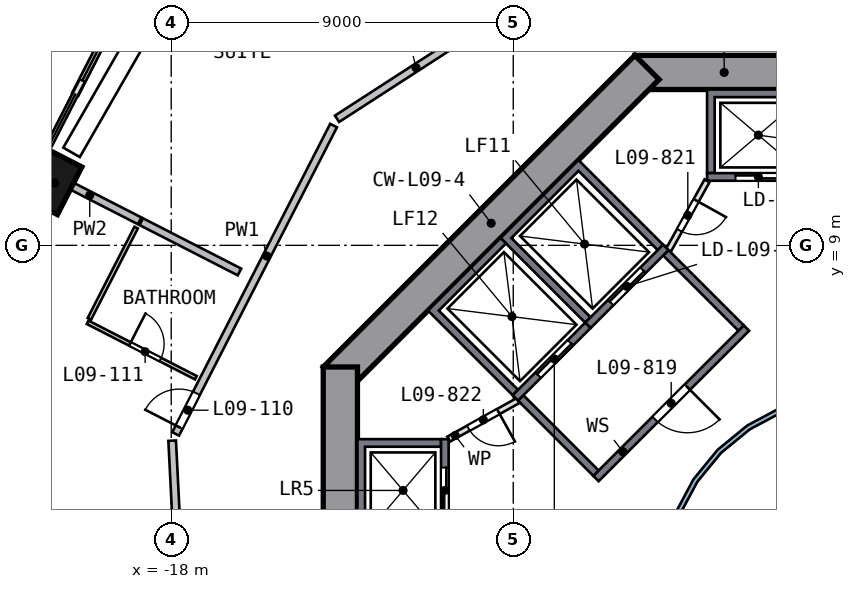
"""IFC4 building model, lengths in metres.
Left out: names, types, materials, properties, quantities, classifications, styles, units other than length and angle.
Written with IfcOpenShell. Run it as: python <this file> out.ifc"""

import sys

from ifc_helpers import new_model, si_unit, direction, frame, frame_2d, origin, origin_2d, place, context, subcontext, project, spatial, polyline, rectangle, outline, extrude, element, fill, save


model = new_model("IFC4")
c1 = context("Model", 3, precision=1e-05, world=origin(), true_north=direction((0.0, 1.0)))
c2 = subcontext(c1, "Body", "Model", "MODEL_VIEW")
j1 = project(units=[si_unit("LENGTHUNIT", "METRE"), si_unit("PLANEANGLEUNIT", "RADIAN")], contexts=[c1])
p1 = place(None, origin())
s1 = spatial("IfcSite", under=j1, at=p1, CompositionType="ELEMENT")
p2 = place(p1, origin())
s2 = spatial("IfcBuilding", under=s1, at=p2, CompositionType="ELEMENT")
p3 = place(p2, frame((0.0, 0.0, 46.0)))
s3 = spatial("IfcBuildingStorey", under=s2, at=p3, CompositionType="ELEMENT", Elevation=46.0)
p4 = place(p3, frame((-21.013, 10.762, 0.0), z_axis=(-0.050345335, -0.100386469, 0.993673943), x_axis=(-0.452981845, -0.884418594, -0.112299596)))
e1 = element("IfcColumn", 1, at=p4, inside=s3, PredefinedType="COLUMN", context=c2, shape_type="SweptSolid", body=[
    extrude(rectangle(XDim=1.4, YDim=0.9, at=origin_2d()), origin(), (0.0, 0.0, 1.0), 3.21),
])
p5 = place(p3, frame((5.799, 13.55, 0.0), z_axis=(0.0, 0.0, 1.0), x_axis=(-1.0, 0.0, 0.0)))
e2 = element("IfcWall", 2, at=p5, inside=s3, PredefinedType="SHEAR", context=c2, shape_type="SweptSolid", body=[
    extrude(rectangle(XDim=11.598, YDim=0.9, at=frame_2d((5.799, 0.0))), origin(), (0.0, 0.0, 1.0), 3.5),
])
p6 = place(p5, frame((4.899, 0.0, 0.0)))
e3 = element("IfcOpeningElement", 3, at=p6, cuts=e2, PredefinedType="OPENING", context=c2, shape_type="SweptSolid", body=[
    extrude(rectangle(XDim=1.8, YDim=2.1, at=frame_2d((0.9, 1.05))), frame((0.0, 0.46, 0.0), z_axis=(0.0, -1.0, 0.0), x_axis=(1.0, 0.0, 0.0)), (0.0, 0.0, 1.0), 0.92),
])
p7 = place(p3, frame((-5.481, 13.682, 0.0), z_axis=(0.0, 0.0, 1.0), x_axis=(-0.707106781, -0.707106781, 0.0)))
e4 = element("IfcWall", 4, at=p7, inside=s3, PredefinedType="SHEAR", context=c2, shape_type="SweptSolid", body=[
    extrude(rectangle(XDim=11.598, YDim=0.9, at=frame_2d((5.799, 0.0))), origin(), (0.0, 0.0, 1.0), 3.5),
])
p8 = place(p3, frame((-13.55, 5.799, 0.0), z_axis=(0.0, 0.0, 1.0), x_axis=(0.0, -1.0, 0.0)))
e5 = element("IfcWall", 5, at=p8, inside=s3, PredefinedType="SHEAR", context=c2, shape_type="SweptSolid", body=[
    extrude(rectangle(XDim=11.598, YDim=0.9, at=frame_2d((5.799, 0.0))), origin(), (0.0, 0.0, 1.0), 3.5),
])
p9 = place(p8, frame((4.899, 0.0, 0.0)))
e6 = element("IfcOpeningElement", 6, at=p9, cuts=e5, PredefinedType="OPENING", context=c2, shape_type="SweptSolid", body=[
    extrude(rectangle(XDim=1.8, YDim=2.1, at=frame_2d((0.9, 1.05))), frame((0.0, 0.46, 0.0), z_axis=(0.0, -1.0, 0.0), x_axis=(1.0, 0.0, 0.0)), (0.0, 0.0, 1.0), 0.92),
])
p10 = place(p3, frame((-18.607, 16.72, 0.0), z_axis=(0.0, 0.0, 1.0), x_axis=(-0.455821941, -0.890070985, 0.0)))
e7 = element("IfcWall", 7, at=p10, inside=s3, PredefinedType="SOLIDWALL", context=c2, shape_type="SweptSolid", body=[
    extrude(rectangle(XDim=4.199, YDim=0.15, at=frame_2d((2.099, 0.0))), origin(), (0.0, 0.0, 1.0), 2.425),
])
p11 = place(p10, frame((1.399, 0.0, 0.0)))
e8 = element("IfcOpeningElement", 8, at=p11, cuts=e7, PredefinedType="OPENING", context=c2, shape_type="SweptSolid", body=[
    extrude(rectangle(XDim=2.4, YDim=2.4, at=frame_2d((1.2, 1.2))), frame((0.0, 0.085, 0.0), z_axis=(0.0, -1.0, 0.0), x_axis=(1.0, 0.0, 0.0)), (0.0, 0.0, 1.0), 0.17),
])
p12 = place(p3, frame((-20.924, 18.832, 0.0), z_axis=(0.0, 0.0, 1.0), x_axis=(-0.45585284, -0.89005516, 0.0)))
e9 = element("IfcWall", 9, at=p12, inside=s3, PredefinedType="SOLIDWALL", context=c2, shape_type="SweptSolid", body=[
    extrude(rectangle(XDim=13.723, YDim=0.5, at=frame_2d((6.862, 0.0))), origin(), (0.0, 0.0, 1.0), 0.7),
])
p13 = place(p3, origin())
e10 = element("IfcWall", 10, at=p13, inside=s3, PredefinedType="SOLIDWALL", context=c2, shape_type="SweptSolid", body=[
    extrude(outline(polyline([(-3.9, 10.9), (-3.9, 13.1), (-1.2, 13.1), (-1.2, 10.9), (-1.4, 10.9), (-1.4, 12.9), (-3.7, 12.9), (-3.7, 10.9), (-3.9, 10.9)])), origin(), (0.0, 0.0, 1.0), 3.19),
])
p14 = place(p3, frame((-1.2, 10.8, 0.0), z_axis=(0.0, 0.0, 1.0), x_axis=(-1.0, 0.0, 0.0)))
e11 = element("IfcWall", 11, at=p14, inside=s3, PredefinedType="SOLIDWALL", context=c2, shape_type="SweptSolid", body=[
    extrude(rectangle(XDim=2.7, YDim=0.2, at=frame_2d((1.35, 0.0))), origin(), (0.0, 0.0, 1.0), 3.19),
])
p15 = place(p14, frame((0.75, 0.0, 0.0)))
e12 = element("IfcOpeningElement", 12, at=p15, cuts=e11, PredefinedType="OPENING", context=c2, shape_type="SweptSolid", body=[
    extrude(rectangle(XDim=1.2, YDim=2.1, at=frame_2d((0.6, 1.05))), frame((0.0, 0.11, 0.0), z_axis=(0.0, -1.0, 0.0), x_axis=(1.0, 0.0, 0.0)), (0.0, 0.0, 1.0), 0.22),
])
p16 = place(p3, origin())
e13 = element("IfcWall", 13, at=p16, inside=s3, PredefinedType="SOLIDWALL", context=c2, shape_type="SweptSolid", body=[
    extrude(outline(polyline([(-13.1, 3.9), (-10.9, 3.9), (-10.9, 3.7), (-12.9, 3.7), (-12.9, 1.4), (-10.9, 1.4), (-10.9, 1.2), (-13.1, 1.2), (-13.1, 3.9)])), origin(), (0.0, 0.0, 1.0), 3.19),
])
p17 = place(p3, frame((-10.8, 1.2, 0.0), z_axis=(0.0, 0.0, 1.0), x_axis=(0.0, 1.0, 0.0)))
e14 = element("IfcWall", 14, at=p17, inside=s3, PredefinedType="SOLIDWALL", context=c2, shape_type="SweptSolid", body=[
    extrude(rectangle(XDim=2.7, YDim=0.2, at=frame_2d((1.35, 0.0))), origin(), (0.0, 0.0, 1.0), 3.19),
])
p18 = place(p17, frame((0.75, 0.0, 0.0)))
e15 = element("IfcOpeningElement", 15, at=p18, cuts=e14, PredefinedType="OPENING", context=c2, shape_type="SweptSolid", body=[
    extrude(rectangle(XDim=1.2, YDim=2.1, at=frame_2d((0.6, 1.05))), frame((0.0, 0.11, 0.0), z_axis=(0.0, -1.0, 0.0), x_axis=(1.0, 0.0, 0.0)), (0.0, 0.0, 1.0), 0.22),
])
p19 = place(p3, origin())
e16 = element("IfcWall", 16, at=p19, inside=s3, PredefinedType="SOLIDWALL", context=c2, shape_type="SweptSolid", body=[
    extrude(outline(polyline([(-9.334, 9.192), (-7.283, 11.243), (-5.056, 9.016), (-5.197, 8.874), (-7.283, 10.96), (-9.051, 9.192), (-6.965, 7.106), (-7.106, 6.965), (-9.334, 9.192)])), origin(), (0.0, 0.0, 1.0), 3.19),
])
p20 = place(p3, frame((-4.985, 8.945, 0.0), z_axis=(0.0, 0.0, 1.0), x_axis=(-0.707106781, -0.707106781, 0.0)))
e17 = element("IfcWall", 17, at=p20, inside=s3, PredefinedType="SOLIDWALL", context=c2, shape_type="SweptSolid", body=[
    extrude(rectangle(XDim=2.9, YDim=0.2, at=frame_2d((1.45, 0.0))), origin(), (0.0, 0.0, 1.0), 3.19),
])
p21 = place(p20, frame((0.85, 0.0, 0.0)))
e18 = element("IfcOpeningElement", 18, at=p21, cuts=e17, PredefinedType="OPENING", context=c2, shape_type="SweptSolid", body=[
    extrude(rectangle(XDim=1.2, YDim=2.1, at=frame_2d((0.6, 1.05))), frame((0.0, 0.11, 0.0), z_axis=(0.0, -1.0, 0.0), x_axis=(1.0, 0.0, 0.0)), (0.0, 0.0, 1.0), 0.22),
])
p22 = place(p3, origin())
e19 = element("IfcWall", 19, at=p22, inside=s3, PredefinedType="SOLIDWALL", context=c2, shape_type="SweptSolid", body=[
    extrude(outline(polyline([(-11.243, 7.283), (-9.334, 9.192), (-9.192, 9.051), (-10.96, 7.283), (-8.874, 5.197), (-9.016, 5.056), (-11.243, 7.283)])), origin(), (0.0, 0.0, 1.0), 3.19),
])
p23 = place(p3, frame((-7.036, 6.894, 0.0), z_axis=(0.0, 0.0, 1.0), x_axis=(-0.707106781, -0.707106781, 0.0)))
e20 = element("IfcWall", 20, at=p23, inside=s3, PredefinedType="SOLIDWALL", context=c2, shape_type="SweptSolid", body=[
    extrude(rectangle(XDim=2.7, YDim=0.2, at=frame_2d((1.35, 0.0))), origin(), (0.0, 0.0, 1.0), 3.19),
])
p24 = place(p23, frame((0.65, 0.0, 0.0)))
e21 = element("IfcOpeningElement", 21, at=p24, cuts=e20, PredefinedType="OPENING", context=c2, shape_type="SweptSolid", body=[
    extrude(rectangle(XDim=1.2, YDim=2.1, at=frame_2d((0.6, 1.05))), frame((0.0, 0.11, 0.0), z_axis=(0.0, -1.0, 0.0), x_axis=(1.0, 0.0, 0.0)), (0.0, 0.0, 1.0), 0.22),
])
p25 = place(p3, frame((-2.864, 6.823, 0.0), z_axis=(0.0, 0.0, 1.0), x_axis=(-0.707106781, -0.707106781, 0.0)))
e22 = element("IfcWall", 22, at=p25, inside=s3, PredefinedType="SOLIDWALL", context=c2, shape_type="SweptSolid", body=[
    extrude(rectangle(XDim=5.6, YDim=0.2, at=frame_2d((2.8, 0.0))), origin(), (0.0, 0.0, 1.0), 3.19),
])
p26 = place(p25, frame((2.2, 0.0, 0.0)))
e23 = element("IfcOpeningElement", 23, at=p26, cuts=e22, PredefinedType="OPENING", context=c2, shape_type="SweptSolid", body=[
    extrude(rectangle(XDim=1.2, YDim=2.1, at=frame_2d((0.6, 1.05))), frame((0.0, 0.11, 0.0), z_axis=(0.0, -1.0, 0.0), x_axis=(1.0, 0.0, 0.0)), (0.0, 0.0, 1.0), 0.22),
])
for number, where, z_axis, x_axis in (
    (24, (-3.005, 6.823, 0.0), (0.0, 0.0, 1.0), (-0.707, 0.707, 0.0)),
    (25, (-6.823, 3.005, 0.0), (0.0, 0.0, 1.0), (-0.707, 0.707, 0.0)),
):
    element("IfcWall", number, at=place(p3, frame(where, z_axis=z_axis, x_axis=x_axis)), inside=s3, PredefinedType="SOLIDWALL", context=c2, shape_type="SweptSolid", body=[
        extrude(rectangle(XDim=2.8, YDim=0.2, at=frame_2d((1.4, 0.0))), origin(), (0.0, 0.0, 1.0), 3.19),
    ])
p27 = place(p3, frame((-3.9, 10.7, 0.0), z_axis=(0.0, 0.0, 1.0), x_axis=(-0.485692555, -0.874129705, 0.0)))
e26 = element("IfcWall", 26, at=p27, inside=s3, PredefinedType="PARTITIONING", context=c2, shape_type="SweptSolid", body=[
    extrude(rectangle(XDim=2.089, YDim=0.15, at=frame_2d((1.044, 0.0))), origin(), (0.0, 0.0, 1.0), 3.19),
])
p28 = place(p27, frame((0.594, 0.0, 0.0)))
e27 = element("IfcOpeningElement", 27, at=p28, cuts=e26, PredefinedType="OPENING", context=c2, shape_type="SweptSolid", body=[
    extrude(rectangle(XDim=0.9, YDim=2.1, at=frame_2d((0.45, 1.05))), frame((0.0, 0.085, 0.0), z_axis=(0.0, -1.0, 0.0), x_axis=(1.0, 0.0, 0.0)), (0.0, 0.0, 1.0), 0.17),
])
p29 = place(p3, frame((-8.874, 4.914, 0.0), z_axis=(0.0, 0.0, 1.0), x_axis=(-0.874129705, -0.485692555, 0.0)))
e28 = element("IfcWall", 28, at=p29, inside=s3, PredefinedType="PARTITIONING", context=c2, shape_type="SweptSolid", body=[
    extrude(rectangle(XDim=2.089, YDim=0.15, at=frame_2d((1.044, 0.0))), origin(), (0.0, 0.0, 1.0), 3.19),
])
p30 = place(p29, frame((0.594, 0.0, 0.0)))
e29 = element("IfcOpeningElement", 29, at=p30, cuts=e28, PredefinedType="OPENING", context=c2, shape_type="SweptSolid", body=[
    extrude(rectangle(XDim=0.9, YDim=2.1, at=frame_2d((0.45, 1.05))), frame((0.0, 0.085, 0.0), z_axis=(0.0, -1.0, 0.0), x_axis=(1.0, 0.0, 0.0)), (0.0, 0.0, 1.0), 0.17),
])
p31 = place(p3, origin())
e30 = element("IfcWall", 30, at=p31, inside=s3, PredefinedType="SOLIDWALL", context=c2, shape_type="SweptSolid", body=[
    extrude(outline(polyline([(5.021, -0.999), (4.73, -1.959), (4.257, -2.844), (3.62, -3.62), (2.844, -4.257), (1.959, -4.73), (0.999, -5.021), (0.0, -5.12), (-0.999, -5.021), (-1.959, -4.73), (-2.844, -4.257), (-3.62, -3.62), (-4.257, -2.844), (-4.73, -1.959), (-5.021, -0.999), (-5.12, 0.0), (-5.021, 0.999), (-4.73, 1.959), (-4.257, 2.844), (-3.62, 3.62), (-2.844, 4.257), (-1.959, 4.73), (-0.999, 5.021), (0.0, 5.12), (0.999, 5.021), (1.959, 4.73), (2.844, 4.257), (3.62, 3.62), (4.257, 2.844), (4.73, 1.959), (5.021, 0.999), (5.12, 0.0), (5.021, -0.999)]), holes=[polyline([(4.904, 0.976), (4.619, 1.913), (4.157, 2.778), (3.535, 3.535), (2.778, 4.157), (1.913, 4.619), (0.976, 4.904), (0.0, 5.0), (-0.976, 4.904), (-1.913, 4.619), (-2.778, 4.157), (-3.535, 3.535), (-4.157, 2.778), (-4.619, 1.913), (-4.904, 0.976), (-5.0, 0.0), (-4.904, -0.976), (-4.619, -1.913), (-4.157, -2.778), (-3.535, -3.535), (-2.778, -4.157), (-1.913, -4.619), (-0.976, -4.904), (0.0, -5.0), (0.976, -4.904), (1.913, -4.619), (2.778, -4.157), (3.535, -3.535), (4.157, -2.778), (4.619, -1.913), (4.904, -0.976), (5.0, 0.0), (4.904, 0.976)])]), origin(), (0.0, 0.0, 1.0), 3.19),
])
p32 = place(p3, frame((-17.975, 3.86, 0.0), z_axis=(0.0, 0.0, 1.0), x_axis=(0.050258786, -0.998736229, 0.0)))
e31 = element("IfcWall", 31, at=p32, inside=s3, PredefinedType="SOLIDWALL", context=c2, shape_type="SweptSolid", body=[
    extrude(rectangle(XDim=9.516, YDim=0.2, at=frame_2d((4.758, 0.0))), origin(), (0.0, 0.0, 1.0), 3.19),
])
p33 = place(p3, frame((-17.884, 4.039, 0.0), z_axis=(0.0, 0.0, 1.0), x_axis=(0.45584896, 0.890057147, 0.0)))
e32 = element("IfcWall", 32, at=p33, inside=s3, PredefinedType="SOLIDWALL", context=c2, shape_type="SweptSolid", body=[
    extrude(rectangle(XDim=9.115, YDim=0.2, at=frame_2d((4.558, 0.0))), origin(), (0.0, 0.0, 1.0), 3.19),
])
p34 = place(p33, frame((0.2, 0.0, 0.0)))
e33 = element("IfcOpeningElement", 33, at=p34, cuts=e32, PredefinedType="OPENING", context=c2, shape_type="SweptSolid", body=[
    extrude(rectangle(XDim=1.0, YDim=2.1, at=frame_2d((0.5, 1.05))), frame((0.0, 0.11, 0.0), z_axis=(0.0, -1.0, 0.0), x_axis=(1.0, 0.0, 0.0)), (0.0, 0.0, 1.0), 0.22),
])
p35 = place(p3, frame((-13.636, 12.331, 0.0), z_axis=(0.0, 0.0, 1.0), x_axis=(0.83981686, 0.54286982, 0.0)))
e34 = element("IfcWall", 34, at=p35, inside=s3, PredefinedType="SOLIDWALL", context=c2, shape_type="SweptSolid", body=[
    extrude(rectangle(XDim=9.316, YDim=0.2, at=frame_2d((4.658, 0.0))), origin(), (0.0, 0.0, 1.0), 3.19),
])
p36 = place(p35, frame((5.15, 0.0, 0.0)))
e35 = element("IfcOpeningElement", 35, at=p36, cuts=e34, PredefinedType="OPENING", context=c2, shape_type="SweptSolid", body=[
    extrude(rectangle(XDim=1.0, YDim=2.1, at=frame_2d((0.5, 1.05))), frame((0.0, 0.11, 0.0), z_axis=(0.0, -1.0, 0.0), x_axis=(1.0, 0.0, 0.0)), (0.0, 0.0, 1.0), 0.22),
])
p37 = place(p3, frame((-18.83, 9.644, 0.0), z_axis=(0.0, 0.0, 1.0), x_axis=(-0.890051549, 0.45585989, 0.0)))
e36 = element("IfcWall", 36, at=p37, inside=s3, PredefinedType="SOLIDWALL", context=c2, shape_type="SweptSolid", body=[
    extrude(rectangle(XDim=2.952, YDim=0.2, at=frame_2d((1.476, 0.0))), origin(), (0.0, 0.0, 1.0), 3.19),
])
p38 = place(p3, frame((-16.204, 8.299, 0.0), z_axis=(0.0, 0.0, 1.0), x_axis=(-0.890030887, 0.45590023, 0.0)))
e37 = element("IfcWall", 37, at=p38, inside=s3, PredefinedType="SOLIDWALL", context=c2, shape_type="SweptSolid", body=[
    extrude(rectangle(XDim=2.905, YDim=0.2, at=frame_2d((1.452, 0.0))), origin(), (0.0, 0.0, 1.0), 3.19),
])
p39 = place(p3, frame((-20.154, 7.064, 0.0), z_axis=(0.0, 0.0, 1.0), x_axis=(0.455909064, 0.890026362, 0.0)))
e38 = element("IfcWall", 38, at=p39, inside=s3, PredefinedType="PARTITIONING", context=c2, shape_type="SweptSolid", body=[
    extrude(rectangle(XDim=2.7, YDim=0.1, at=frame_2d((1.35, 0.0))), origin(), (0.0, 0.0, 1.0), 3.19),
])
p40 = place(p3, frame((-20.2, 6.975, 0.0), z_axis=(0.0, 0.0, 1.0), x_axis=(0.89003657, -0.455889135, 0.0)))
e39 = element("IfcWall", 39, at=p40, inside=s3, PredefinedType="PARTITIONING", context=c2, shape_type="SweptSolid", body=[
    extrude(rectangle(XDim=3.2, YDim=0.1, at=frame_2d((1.6, 0.0))), origin(), (0.0, 0.0, 1.0), 3.19),
])
p41 = place(p40, frame((1.25, 0.0, 0.0)))
e40 = element("IfcOpeningElement", 40, at=p41, cuts=e39, PredefinedType="OPENING", context=c2, shape_type="SweptSolid", body=[
    extrude(rectangle(XDim=0.9, YDim=2.1, at=frame_2d((0.45, 1.05))), frame((0.0, 0.06, 0.0), z_axis=(0.0, -1.0, 0.0), x_axis=(1.0, 0.0, 0.0)), (0.0, 0.0, 1.0), 0.12),
])
p42 = place(p11, origin())
e41 = element("IfcDoor", 41, at=p42, inside=s3, OperationType="SLIDING_TO_LEFT", PredefinedType="DOOR", context=c2, shape_type="SweptSolid", body=[
    extrude(rectangle(XDim=2.4, YDim=2.4, at=frame_2d((1.2, 1.2))), frame((0.0, 0.025, 0.0), z_axis=(0.0, -1.0, 0.0), x_axis=(1.0, 0.0, 0.0)), (0.0, 0.0, 1.0), 0.05),
])
fill(e8, e41)
p43 = place(p15, origin())
e42 = element("IfcDoor", 42, at=p43, inside=s3, OperationType="DOUBLE_DOOR_SLIDING", PredefinedType="DOOR", context=c2, shape_type="SweptSolid", body=[
    extrude(rectangle(XDim=1.2, YDim=2.1, at=frame_2d((0.6, 1.05))), frame((0.0, 0.025, 0.0), z_axis=(0.0, -1.0, 0.0), x_axis=(1.0, 0.0, 0.0)), (0.0, 0.0, 1.0), 0.05),
])
fill(e12, e42)
p44 = place(p18, origin())
e43 = element("IfcDoor", 43, at=p44, inside=s3, OperationType="DOUBLE_DOOR_SLIDING", PredefinedType="DOOR", context=c2, shape_type="SweptSolid", body=[
    extrude(rectangle(XDim=1.2, YDim=2.1, at=frame_2d((0.6, 1.05))), frame((0.0, 0.025, 0.0), z_axis=(0.0, -1.0, 0.0), x_axis=(1.0, 0.0, 0.0)), (0.0, 0.0, 1.0), 0.05),
])
fill(e15, e43)
p45 = place(p21, origin())
e44 = element("IfcDoor", 44, at=p45, inside=s3, OperationType="DOUBLE_DOOR_SLIDING", PredefinedType="DOOR", context=c2, shape_type="SweptSolid", body=[
    extrude(rectangle(XDim=1.2, YDim=2.1, at=frame_2d((0.6, 1.05))), frame((0.0, 0.025, 0.0), z_axis=(0.0, -1.0, 0.0), x_axis=(1.0, 0.0, 0.0)), (0.0, 0.0, 1.0), 0.05),
])
fill(e18, e44)
p46 = place(p24, origin())
e45 = element("IfcDoor", 45, at=p46, inside=s3, OperationType="DOUBLE_DOOR_SLIDING", PredefinedType="DOOR", context=c2, shape_type="SweptSolid", body=[
    extrude(rectangle(XDim=1.2, YDim=2.1, at=frame_2d((0.6, 1.05))), frame((0.0, 0.025, 0.0), z_axis=(0.0, -1.0, 0.0), x_axis=(1.0, 0.0, 0.0)), (0.0, 0.0, 1.0), 0.05),
])
fill(e21, e45)
p47 = place(p26, origin())
e46 = element("IfcDoor", 46, at=p47, inside=s3, OperationType="SINGLE_SWING_LEFT", PredefinedType="DOOR", context=c2, shape_type="SweptSolid", body=[
    extrude(rectangle(XDim=1.2, YDim=2.1, at=frame_2d((0.6, 1.05))), frame((0.0, 0.025, 0.0), z_axis=(0.0, -1.0, 0.0), x_axis=(1.0, 0.0, 0.0)), (0.0, 0.0, 1.0), 0.05),
])
fill(e23, e46)
p48 = place(p28, origin())
e47 = element("IfcDoor", 47, at=p48, inside=s3, OperationType="SINGLE_SWING_LEFT", PredefinedType="DOOR", context=c2, shape_type="SweptSolid", body=[
    extrude(rectangle(XDim=0.9, YDim=2.1, at=frame_2d((0.45, 1.05))), frame((0.0, 0.025, 0.0), z_axis=(0.0, -1.0, 0.0), x_axis=(1.0, 0.0, 0.0)), (0.0, 0.0, 1.0), 0.05),
])
fill(e27, e47)
p49 = place(p30, origin())
e48 = element("IfcDoor", 48, at=p49, inside=s3, OperationType="SINGLE_SWING_LEFT", PredefinedType="DOOR", context=c2, shape_type="SweptSolid", body=[
    extrude(rectangle(XDim=0.9, YDim=2.1, at=frame_2d((0.45, 1.05))), frame((0.0, 0.025, 0.0), z_axis=(0.0, -1.0, 0.0), x_axis=(1.0, 0.0, 0.0)), (0.0, 0.0, 1.0), 0.05),
])
fill(e29, e48)
p50 = place(p34, origin())
e49 = element("IfcDoor", 49, at=p50, inside=s3, OperationType="SINGLE_SWING_LEFT", PredefinedType="DOOR", context=c2, shape_type="SweptSolid", body=[
    extrude(rectangle(XDim=1.0, YDim=2.1, at=frame_2d((0.5, 1.05))), frame((0.0, 0.025, 0.0), z_axis=(0.0, -1.0, 0.0), x_axis=(1.0, 0.0, 0.0)), (0.0, 0.0, 1.0), 0.05),
])
fill(e33, e49)
p51 = place(p41, origin())
e50 = element("IfcDoor", 50, at=p51, inside=s3, OperationType="SINGLE_SWING_LEFT", PredefinedType="DOOR", context=c2, shape_type="SweptSolid", body=[
    extrude(rectangle(XDim=0.9, YDim=2.1, at=frame_2d((0.45, 1.05))), frame((0.0, 0.025, 0.0), z_axis=(0.0, -1.0, 0.0), x_axis=(1.0, 0.0, 0.0)), (0.0, 0.0, 1.0), 0.05),
])
fill(e40, e50)
save(model, sys.argv[1])
